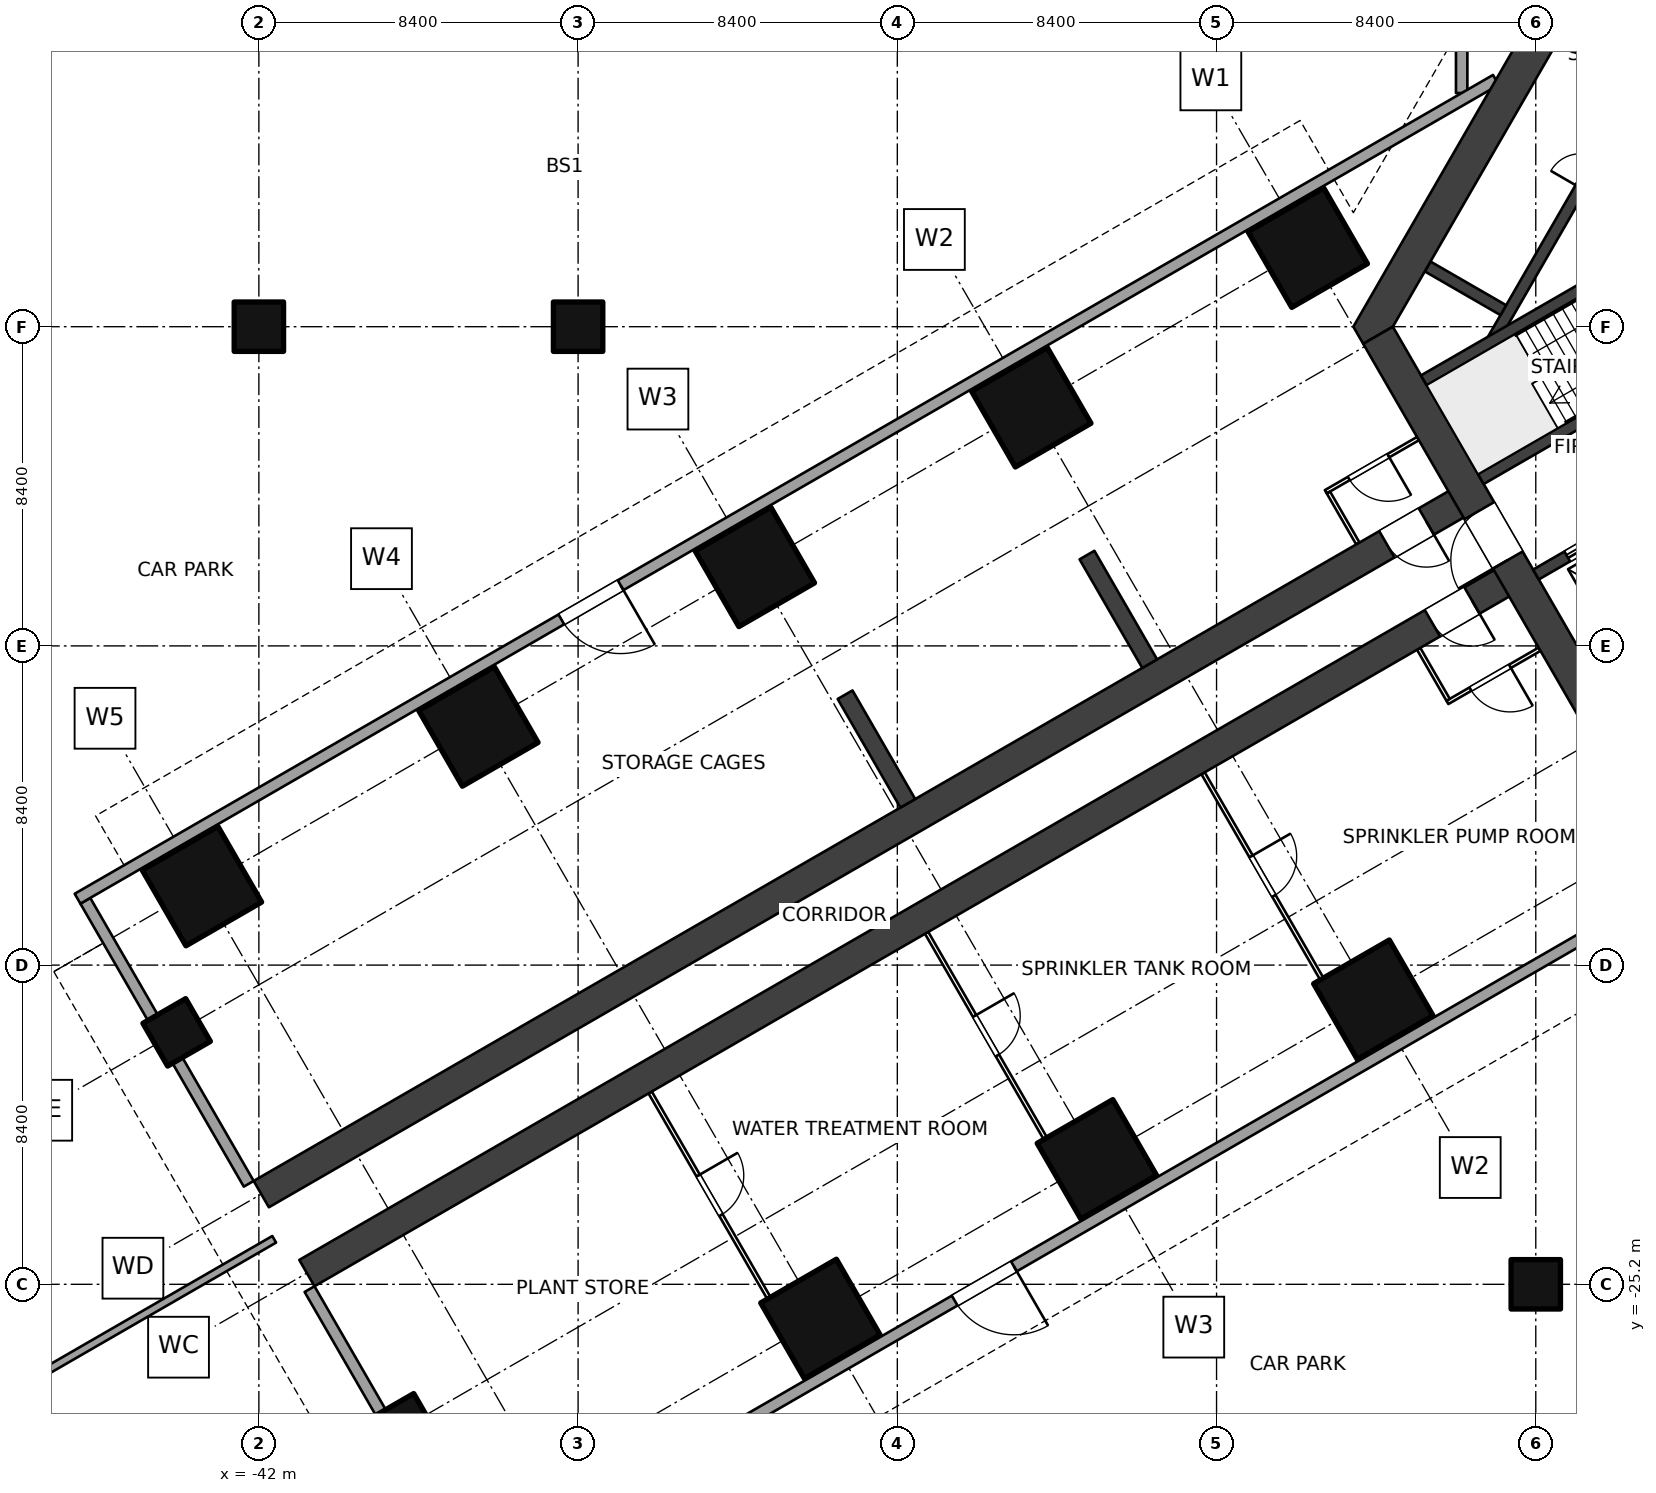
"""IFC4 building model, lengths in metres.
Left out: names, types, materials, properties, quantities, classifications, styles, units other than length and angle.
Written with IfcOpenShell. Run it as: python <this file> out.ifc"""

import sys

from ifc_helpers import new_model, si_unit, direction, frame, frame_2d, origin, origin_2d, place, context, subcontext, project, spatial, polyline, rectangle, outline, extrude, element, fill, save


model = new_model("IFC4")
c1 = context("Model", 3, precision=1e-05, world=origin(), true_north=direction((0.0, 1.0)))
c2 = subcontext(c1, "Body", "Model", "MODEL_VIEW")
j1 = project(units=[si_unit("LENGTHUNIT", "METRE"), si_unit("PLANEANGLEUNIT", "RADIAN")], contexts=[c1])
p1 = place(None, origin())
s1 = spatial("IfcSite", under=j1, at=p1, CompositionType="ELEMENT")
p2 = place(p1, origin())
s2 = spatial("IfcBuilding", under=s1, at=p2, CompositionType="ELEMENT")
p3 = place(p2, frame((0.0, 0.0, -10.5)))
s3 = spatial("IfcBuildingStorey", under=s2, at=p3, CompositionType="ELEMENT", Elevation=-10.5)
for number, where, z_axis, x_axis in (
    (1, (-14.4, 2.078, 0.0), (0.0, 0.0, 1.0), (-0.5, 0.866, 0.0)),
    (2, (-12.675, -17.71, 0.0), (0.0, 0.0, 1.0), (-0.5, 0.866, 0.0)),
    (3, (-21.675, -2.122, 0.0), (0.0, 0.0, 1.0), (-0.5, 0.866, 0.0)),
    (4, (-19.949, -21.91, 0.0), (0.0, 0.0, 1.0), (-0.5, 0.866, 0.0)),
    (5, (-28.949, -6.322, 0.0), (0.0, 0.0, 1.0), (-0.5, 0.866, 0.0)),
    (6, (-27.224, -26.11, 0.0), (0.0, 0.0, 1.0), (-0.5, 0.866, 0.0)),
    (7, (-36.224, -10.521, 0.0), (0.0, 0.0, 1.0), (-0.5, 0.866, 0.0)),
    (8, (-43.499, -14.721, 0.0), (0.0, 0.0, 1.0), (-0.5, 0.866, 0.0)),
):
    element("IfcColumn", number, at=place(p3, frame(where, z_axis=z_axis, x_axis=x_axis)), inside=s3, PredefinedType="COLUMN", context=c2, shape_type="SweptSolid", body=[
        extrude(rectangle(XDim=2.3, YDim=2.3, at=origin_2d()), origin(), (0.0, 0.0, 1.0), 3.5),
    ])
for number, where, z_axis, x_axis in (
    (9, (-38.164, -28.962, 0.0), (0.0, 0.0, 1.0), (-0.5, 0.866, 0.0)),
    (10, (-44.164, -18.57, 0.0), (0.0, 0.0, 1.0), (-0.5, 0.866, 0.0)),
    (11, (-42.0, 0.0, 0.0), (0.0, 0.0, 1.0), (1.0, 0.0, 0.0)),
    (12, (-33.6, 0.0, 0.0), (0.0, 0.0, 1.0), (1.0, 0.0, 0.0)),
    (13, (-8.4, -25.2, 0.0), (0.0, 0.0, 1.0), (1.0, 0.0, 0.0)),
):
    element("IfcColumn", number, at=place(p3, frame(where, z_axis=z_axis, x_axis=x_axis)), inside=s3, PredefinedType="COLUMN", context=c2, shape_type="SweptSolid", body=[
        extrude(rectangle(XDim=1.3, YDim=1.3, at=origin_2d()), origin(), (0.0, 0.0, 1.0), 3.5),
    ])
p4 = place(p3, frame((-6.47, -10.757, 0.0), z_axis=(0.0, 0.0, 1.0), x_axis=(-0.499997612506, 0.8660267822, 0.0)))
e14 = element("IfcWall", 14, at=p4, inside=s3, PredefinedType="SHEAR", context=c2, shape_type="SweptSolid", body=[
    extrude(rectangle(XDim=12.161, YDim=0.9, at=frame_2d((6.08, 0.0))), origin(), (0.0, 0.0, 1.0), 3.5),
])
p5 = place(p4, frame((5.33, 0.0, 0.0)))
e15 = element("IfcOpeningElement", 15, at=p5, cuts=e14, PredefinedType="OPENING", context=c2, shape_type="SweptSolid", body=[
    extrude(rectangle(XDim=1.5, YDim=2.1, at=frame_2d((0.75, 1.05))), frame((0.0, 0.46, 0.0), z_axis=(0.0, -1.0, 0.0), x_axis=(1.0, 0.0, 0.0)), (0.0, 0.0, 1.0), 0.92),
])
p6 = place(p3, origin())
e16 = element("IfcWall", 16, at=p6, inside=s3, PredefinedType="SHEAR", context=c2, shape_type="SweptSolid", body=[
    extrude(outline(polyline([(-6.6, 11.432), (-13.2, 0.0), (-12.94, -0.45), (-12.161, 0.0), (-6.08, 10.531), (-6.08, 11.432), (-6.6, 11.432)])), origin(), (0.0, 0.0, 1.0), 3.5),
])
p7 = place(p3, frame((-3.869, -0.559, 0.0), z_axis=(0.0, 0.0, 1.0), x_axis=(-0.86602711848, -0.499997030048, 0.0)))
e17 = element("IfcWall", 17, at=p7, inside=s3, PredefinedType="SHEAR", context=c2, shape_type="SweptSolid", body=[
    extrude(rectangle(XDim=6.901, YDim=0.3, at=frame_2d((3.451, 0.0))), origin(), (0.0, 0.0, 1.0), 3.5),
])
p8 = place(p7, frame((0.25, 0.0, 0.0)))
e18 = element("IfcOpeningElement", 18, at=p8, cuts=e17, PredefinedType="OPENING", context=c2, shape_type="SweptSolid", body=[
    extrude(rectangle(XDim=1.0, YDim=2.1, at=frame_2d((0.5, 1.05))), frame((0.0, 0.16, 0.0), z_axis=(0.0, -1.0, 0.0), x_axis=(1.0, 0.0, 0.0)), (0.0, 0.0, 1.0), 0.32),
])
p9 = place(p3, frame((-5.369, 2.039, 0.0), z_axis=(0.0, 0.0, 1.0), x_axis=(-0.86602711848, -0.499997030048, 0.0)))
e19 = element("IfcWall", 19, at=p9, inside=s3, PredefinedType="SHEAR", context=c2, shape_type="SweptSolid", body=[
    extrude(rectangle(XDim=6.901, YDim=0.3, at=frame_2d((3.451, 0.0))), origin(), (0.0, 0.0, 1.0), 3.5),
])
p10 = place(p3, frame((-2.419, -3.071, 0.0), z_axis=(0.0, 0.0, 1.0), x_axis=(-0.86602711848, -0.499997030048, 0.0)))
e20 = element("IfcWall", 20, at=p10, inside=s3, PredefinedType="SHEAR", context=c2, shape_type="SweptSolid", body=[
    extrude(rectangle(XDim=6.901, YDim=0.3, at=frame_2d((3.451, 0.0))), origin(), (0.0, 0.0, 1.0), 3.5),
])
p11 = place(p10, frame((4.85, 0.0, 0.0)))
e21 = element("IfcOpeningElement", 21, at=p11, cuts=e20, PredefinedType="OPENING", context=c2, shape_type="SweptSolid", body=[
    extrude(rectangle(XDim=1.1, YDim=2.1, at=frame_2d((0.55, 1.05))), frame((0.0, 0.16, 0.0), z_axis=(0.0, -1.0, 0.0), x_axis=(1.0, 0.0, 0.0)), (0.0, 0.0, 1.0), 0.32),
])
p12 = place(p3, frame((-9.548, -0.374, 0.0), z_axis=(0.0, 0.0, 1.0), x_axis=(0.500002290144, 0.866024081565, 0.0)))
e22 = element("IfcWall", 22, at=p12, inside=s3, PredefinedType="SHEAR", context=c2, shape_type="SweptSolid", body=[
    extrude(rectangle(XDim=10.195, YDim=0.3, at=frame_2d((5.098, 0.0))), origin(), (0.0, 0.0, 1.0), 3.5),
])
p13 = place(p12, frame((4.648, 0.0, 0.0)))
e23 = element("IfcOpeningElement", 23, at=p13, cuts=e22, PredefinedType="OPENING", context=c2, shape_type="SweptSolid", body=[
    extrude(rectangle(XDim=0.9, YDim=2.1, at=frame_2d((0.45, 1.05))), frame((0.0, 0.16, 0.0), z_axis=(0.0, -1.0, 0.0), x_axis=(1.0, 0.0, 0.0)), (0.0, 0.0, 1.0), 0.32),
])
p14 = place(p3, frame((-9.254, 0.435, 0.0), z_axis=(0.0, 0.0, 1.0), x_axis=(-0.866007057882, 0.500031774688, 0.0)))
e24 = element("IfcWall", 24, at=p14, inside=s3, PredefinedType="SHEAR", context=c2, shape_type="SweptSolid", body=[
    extrude(rectangle(XDim=2.3, YDim=0.3, at=frame_2d((1.15, 0.0))), origin(), (0.0, 0.0, 1.0), 3.5),
])
p15 = place(p3, frame((-8.91, -6.53, 0.0), z_axis=(0.0, 0.0, 1.0), x_axis=(-0.866025284237, -0.500000207062, 0.0)))
e25 = element("IfcWall", 25, at=p15, inside=s3, PredefinedType="SHEAR", context=c2, shape_type="SweptSolid", body=[
    extrude(rectangle(XDim=36.75, YDim=0.8, at=frame_2d((18.375, 0.0))), origin(), (0.0, 0.0, 1.0), 3.5),
])
p16 = place(p15, frame((1.35, 0.0, 0.0)))
e26 = element("IfcOpeningElement", 26, at=p16, cuts=e25, PredefinedType="OPENING", context=c2, shape_type="SweptSolid", body=[
    extrude(rectangle(XDim=1.2, YDim=2.1, at=frame_2d((0.6, 1.05))), frame((0.0, 0.41, 0.0), z_axis=(0.0, -1.0, 0.0), x_axis=(1.0, 0.0, 0.0)), (0.0, 0.0, 1.0), 0.82),
])
p17 = place(p3, frame((-10.11, -4.451, 0.0), z_axis=(0.0, 0.0, 1.0), x_axis=(-0.866025284237, -0.500000207062, 0.0)))
e27 = element("IfcWall", 27, at=p17, inside=s3, PredefinedType="SHEAR", context=c2, shape_type="SweptSolid", body=[
    extrude(rectangle(XDim=36.75, YDim=0.8, at=frame_2d((18.375, 0.0))), origin(), (0.0, 0.0, 1.0), 3.5),
])
p18 = place(p17, frame((1.35, 0.0, 0.0)))
e28 = element("IfcOpeningElement", 28, at=p18, cuts=e27, PredefinedType="OPENING", context=c2, shape_type="SweptSolid", body=[
    extrude(rectangle(XDim=1.2, YDim=2.1, at=frame_2d((0.6, 1.05))), frame((0.0, 0.41, 0.0), z_axis=(0.0, -1.0, 0.0), x_axis=(1.0, 0.0, 0.0)), (0.0, 0.0, 1.0), 0.82),
])
p19 = place(p3, frame((-8.3, -8.487, 0.0), z_axis=(0.0, 0.0, 1.0), x_axis=(-0.866034573852, -0.49998411664, 0.0)))
e29 = element("IfcWall", 29, at=p19, inside=s3, PredefinedType="PARTITIONING", context=c2, shape_type="SweptSolid", body=[
    extrude(rectangle(XDim=2.8, YDim=0.1, at=frame_2d((1.4, 0.0))), origin(), (0.0, 0.0, 1.0), 3.2),
])
p20 = place(p19, frame((0.9, 0.0, 0.0)))
e30 = element("IfcOpeningElement", 30, at=p20, cuts=e29, PredefinedType="OPENING", context=c2, shape_type="SweptSolid", body=[
    extrude(rectangle(XDim=1.2, YDim=2.1, at=frame_2d((0.6, 1.05))), frame((0.0, 0.06, 0.0), z_axis=(0.0, -1.0, 0.0), x_axis=(1.0, 0.0, 0.0)), (0.0, 0.0, 1.0), 0.12),
])
p21 = place(p3, frame((-11.482, -8.476, 0.0), z_axis=(0.0, 0.0, 1.0), x_axis=(0.500017819788, -0.86601511528, 0.0)))
e31 = element("IfcWall", 31, at=p21, inside=s3, PredefinedType="PARTITIONING", context=c2, shape_type="SweptSolid", body=[
    extrude(rectangle(XDim=1.55, YDim=0.1, at=frame_2d((0.775, 0.0))), origin(), (0.0, 0.0, 1.0), 3.2),
])
p22 = place(p3, frame((-17.154, -11.751, 0.0), z_axis=(0.0, 0.0, 1.0), x_axis=(0.500007509209, -0.866021068297, 0.0)))
e32 = element("IfcWall", 32, at=p22, inside=s3, PredefinedType="PARTITIONING", context=c2, shape_type="SweptSolid", body=[
    extrude(rectangle(XDim=8.6, YDim=0.1, at=frame_2d((4.3, 0.0))), origin(), (0.0, 0.0, 1.0), 3.2),
])
p23 = place(p22, frame((2.525, 0.0, 0.0)))
e33 = element("IfcOpeningElement", 33, at=p23, cuts=e32, PredefinedType="OPENING", context=c2, shape_type="SweptSolid", body=[
    extrude(rectangle(XDim=1.2, YDim=2.1, at=frame_2d((0.6, 1.05))), frame((0.0, 0.06, 0.0), z_axis=(0.0, -1.0, 0.0), x_axis=(1.0, 0.0, 0.0)), (0.0, 0.0, 1.0), 0.12),
])
p24 = place(p3, frame((-24.429, -15.951, 0.0), z_axis=(0.0, 0.0, 1.0), x_axis=(0.500007509209, -0.866021068297, 0.0)))
e34 = element("IfcWall", 34, at=p24, inside=s3, PredefinedType="PARTITIONING", context=c2, shape_type="SweptSolid", body=[
    extrude(rectangle(XDim=8.6, YDim=0.1, at=frame_2d((4.3, 0.0))), origin(), (0.0, 0.0, 1.0), 3.2),
])
p25 = place(p24, frame((2.525, 0.0, 0.0)))
e35 = element("IfcOpeningElement", 35, at=p25, cuts=e34, PredefinedType="OPENING", context=c2, shape_type="SweptSolid", body=[
    extrude(rectangle(XDim=1.2, YDim=2.1, at=frame_2d((0.6, 1.05))), frame((0.0, 0.06, 0.0), z_axis=(0.0, -1.0, 0.0), x_axis=(1.0, 0.0, 0.0)), (0.0, 0.0, 1.0), 0.12),
])
p26 = place(p3, frame((-31.703, -20.151, 0.0), z_axis=(0.0, 0.0, 1.0), x_axis=(0.500007509209, -0.866021068297, 0.0)))
e36 = element("IfcWall", 36, at=p26, inside=s3, PredefinedType="PARTITIONING", context=c2, shape_type="SweptSolid", body=[
    extrude(rectangle(XDim=8.6, YDim=0.1, at=frame_2d((4.3, 0.0))), origin(), (0.0, 0.0, 1.0), 3.2),
])
p27 = place(p26, frame((2.525, 0.0, 0.0)))
e37 = element("IfcOpeningElement", 37, at=p27, cuts=e36, PredefinedType="OPENING", context=c2, shape_type="SweptSolid", body=[
    extrude(rectangle(XDim=1.2, YDim=2.1, at=frame_2d((0.6, 1.05))), frame((0.0, 0.06, 0.0), z_axis=(0.0, -1.0, 0.0), x_axis=(1.0, 0.0, 0.0)), (0.0, 0.0, 1.0), 0.12),
])
p28 = place(p3, frame((-11.5, -2.945, 0.0), z_axis=(0.0, 0.0, 1.0), x_axis=(-0.866034573852, -0.49998411664, 0.0)))
e38 = element("IfcWall", 38, at=p28, inside=s3, PredefinedType="PARTITIONING", context=c2, shape_type="SweptSolid", body=[
    extrude(rectangle(XDim=2.8, YDim=0.1, at=frame_2d((1.4, 0.0))), origin(), (0.0, 0.0, 1.0), 3.2),
])
p29 = place(p28, frame((0.9, 0.0, 0.0)))
e39 = element("IfcOpeningElement", 39, at=p29, cuts=e38, PredefinedType="OPENING", context=c2, shape_type="SweptSolid", body=[
    extrude(rectangle(XDim=1.2, YDim=2.1, at=frame_2d((0.6, 1.05))), frame((0.0, 0.06, 0.0), z_axis=(0.0, -1.0, 0.0), x_axis=(1.0, 0.0, 0.0)), (0.0, 0.0, 1.0), 0.12),
])
p30 = place(p3, frame((-13.082, -5.705, 0.0), z_axis=(0.0, 0.0, 1.0), x_axis=(-0.500086022567, 0.865975732936, 0.0)))
e40 = element("IfcWall", 40, at=p30, inside=s3, PredefinedType="PARTITIONING", context=c2, shape_type="SweptSolid", body=[
    extrude(rectangle(XDim=1.55, YDim=0.1, at=frame_2d((0.775, 0.0))), origin(), (0.0, 0.0, 1.0), 3.2),
])
p31 = place(p3, frame((-41.596, -24.016, 0.0), z_axis=(0.0, 0.0, 1.0), x_axis=(-0.866034858292, -0.499983623955, 0.0)))
e41 = element("IfcWall", 41, at=p31, inside=s3, PredefinedType="SOLIDWALL", context=c2, shape_type="SweptSolid", body=[
    extrude(rectangle(XDim=10.627, YDim=0.2, at=frame_2d((5.313, 0.0))), origin(), (0.0, 0.0, 1.0), 3.2),
])
for number, where, z_axis, x_axis in (
    (42, (-40.667, -25.326, 0.0), (0.0, 0.0, 1.0), (0.5, -0.866, 0.0)),
    (43, (-42.267, -22.555, 0.0), (0.0, 0.0, 1.0), (-0.5, 0.866, 0.0)),
):
    element("IfcWall", number, at=place(p3, frame(where, z_axis=z_axis, x_axis=x_axis)), inside=s3, PredefinedType="SOLIDWALL", context=c2, shape_type="SweptSolid", body=[
        extrude(rectangle(XDim=8.6, YDim=0.3, at=frame_2d((4.3, 0.0))), origin(), (0.0, 0.0, 1.0), 1.9),
    ])
p32 = place(p3, frame((-10.35, 6.149, 0.0), z_axis=(0.0, 0.0, 1.0), x_axis=(0.0, 1.0, 0.0)))
e44 = element("IfcWall", 44, at=p32, inside=s3, PredefinedType="SOLIDWALL", context=c2, shape_type="SweptSolid", body=[
    extrude(rectangle(XDim=41.883, YDim=0.3, at=frame_2d((20.941, 0.0))), origin(), (0.0, 0.0, 1.0), 3.2),
])
p33 = place(p32, frame((25.383, 0.0, 0.0)))
e45 = element("IfcOpeningElement", 45, at=p33, cuts=e44, PredefinedType="OPENING", context=c2, shape_type="SweptSolid", body=[
    extrude(rectangle(XDim=1.8, YDim=2.4, at=frame_2d((0.9, 1.2))), frame((0.0, 0.16, 0.0), z_axis=(0.0, -1.0, 0.0), x_axis=(1.0, 0.0, 0.0)), (0.0, 0.0, 1.0), 0.32),
])
p34 = place(p3, frame((-0.15, -12.038, 0.0), z_axis=(0.0, 0.0, 1.0), x_axis=(-0.866026292622, -0.499998460486, 0.0)))
e46 = element("IfcWall", 46, at=p34, inside=s3, PredefinedType="SOLIDWALL", context=c2, shape_type="SweptSolid", body=[
    extrude(rectangle(XDim=41.883, YDim=0.3, at=frame_2d((20.941, 0.0))), origin(), (0.0, 0.0, 1.0), 3.2),
])
p35 = place(p34, frame((25.383, 0.0, 0.0)))
e47 = element("IfcOpeningElement", 47, at=p35, cuts=e46, PredefinedType="OPENING", context=c2, shape_type="SweptSolid", body=[
    extrude(rectangle(XDim=1.8, YDim=2.4, at=frame_2d((0.9, 1.2))), frame((0.0, 0.16, 0.0), z_axis=(0.0, -1.0, 0.0), x_axis=(1.0, 0.0, 0.0)), (0.0, 0.0, 1.0), 0.32),
])
p36 = place(p3, frame((-9.45, 6.495, 0.0), z_axis=(0.0, 0.0, 1.0), x_axis=(-0.866025301493, -0.500000177174, 0.0)))
e48 = element("IfcWall", 48, at=p36, inside=s3, PredefinedType="SOLIDWALL", context=c2, shape_type="SweptSolid", body=[
    extrude(rectangle(XDim=43.095, YDim=0.3, at=frame_2d((21.548, 0.0))), origin(), (0.0, 0.0, 1.0), 3.2),
])
p37 = place(p36, frame((26.595, 0.0, 0.0)))
e49 = element("IfcOpeningElement", 49, at=p37, cuts=e48, PredefinedType="OPENING", context=c2, shape_type="SweptSolid", body=[
    extrude(rectangle(XDim=1.8, YDim=2.4, at=frame_2d((0.9, 1.2))), frame((0.0, 0.16, 0.0), z_axis=(0.0, -1.0, 0.0), x_axis=(1.0, 0.0, 0.0)), (0.0, 0.0, 1.0), 0.32),
])
for number, where, z_axis, x_axis in (
    (50, (-18.559, -8.868, 0.0), (0.0, 0.0, 1.0), (-0.5, 0.866, 0.0)),
    (51, (-24.925, -12.543, 0.0), (0.0, 0.0, 1.0), (-0.5, 0.866, 0.0)),
):
    element("IfcWall", number, at=place(p3, frame(where, z_axis=z_axis, x_axis=x_axis)), inside=s3, PredefinedType="SOLIDWALL", context=c2, shape_type="SweptSolid", body=[
        extrude(rectangle(XDim=3.3, YDim=0.45, at=frame_2d((1.65, 0.0))), origin(), (0.0, 0.0, 1.0), 3.5),
    ])
p38 = place(p11, origin())
e52 = element("IfcDoor", 52, at=p38, inside=s3, OperationType="DOUBLE_DOOR_SLIDING", PredefinedType="DOOR", context=c2, shape_type="SweptSolid", body=[
    extrude(rectangle(XDim=1.1, YDim=2.1, at=frame_2d((0.55, 1.05))), frame((0.0, 0.025, 0.0), z_axis=(0.0, -1.0, 0.0), x_axis=(1.0, 0.0, 0.0)), (0.0, 0.0, 1.0), 0.05),
])
fill(e21, e52)
p39 = place(p5, origin())
e53 = element("IfcDoor", 53, at=p39, inside=s3, OperationType="DOUBLE_DOOR_DOUBLE_SWING", PredefinedType="DOOR", context=c2, shape_type="SweptSolid", body=[
    extrude(rectangle(XDim=1.5, YDim=2.1, at=frame_2d((0.75, 1.05))), frame((0.0, 0.025, 0.0), z_axis=(0.0, -1.0, 0.0), x_axis=(1.0, 0.0, 0.0)), (0.0, 0.0, 1.0), 0.05),
])
fill(e15, e53)
p40 = place(p16, origin())
e54 = element("IfcDoor", 54, at=p40, inside=s3, OperationType="DOUBLE_SWING_LEFT", PredefinedType="DOOR", context=c2, shape_type="SweptSolid", body=[
    extrude(rectangle(XDim=1.2, YDim=2.1, at=frame_2d((0.6, 1.05))), frame((0.0, 0.025, 0.0), z_axis=(0.0, -1.0, 0.0), x_axis=(1.0, 0.0, 0.0)), (0.0, 0.0, 1.0), 0.05),
])
fill(e26, e54)
p41 = place(p23, origin())
e55 = element("IfcDoor", 55, at=p41, inside=s3, OperationType="DOUBLE_SWING_LEFT", PredefinedType="DOOR", context=c2, shape_type="SweptSolid", body=[
    extrude(rectangle(XDim=1.2, YDim=2.1, at=frame_2d((0.6, 1.05))), frame((0.0, 0.025, 0.0), z_axis=(0.0, -1.0, 0.0), x_axis=(1.0, 0.0, 0.0)), (0.0, 0.0, 1.0), 0.05),
])
fill(e33, e55)
p42 = place(p25, origin())
e56 = element("IfcDoor", 56, at=p42, inside=s3, OperationType="DOUBLE_SWING_LEFT", PredefinedType="DOOR", context=c2, shape_type="SweptSolid", body=[
    extrude(rectangle(XDim=1.2, YDim=2.1, at=frame_2d((0.6, 1.05))), frame((0.0, 0.025, 0.0), z_axis=(0.0, -1.0, 0.0), x_axis=(1.0, 0.0, 0.0)), (0.0, 0.0, 1.0), 0.05),
])
fill(e35, e56)
p43 = place(p27, origin())
e57 = element("IfcDoor", 57, at=p43, inside=s3, OperationType="DOUBLE_SWING_LEFT", PredefinedType="DOOR", context=c2, shape_type="SweptSolid", body=[
    extrude(rectangle(XDim=1.2, YDim=2.1, at=frame_2d((0.6, 1.05))), frame((0.0, 0.025, 0.0), z_axis=(0.0, -1.0, 0.0), x_axis=(1.0, 0.0, 0.0)), (0.0, 0.0, 1.0), 0.05),
])
fill(e37, e57)
p44 = place(p20, origin())
e58 = element("IfcDoor", 58, at=p44, inside=s3, OperationType="DOUBLE_SWING_LEFT", PredefinedType="DOOR", context=c2, shape_type="SweptSolid", body=[
    extrude(rectangle(XDim=1.2, YDim=2.1, at=frame_2d((0.6, 1.05))), frame((0.0, 0.025, 0.0), z_axis=(0.0, -1.0, 0.0), x_axis=(1.0, 0.0, 0.0)), (0.0, 0.0, 1.0), 0.05),
])
fill(e30, e58)
p45 = place(p18, origin())
e59 = element("IfcDoor", 59, at=p45, inside=s3, OperationType="DOUBLE_SWING_LEFT", PredefinedType="DOOR", context=c2, shape_type="SweptSolid", body=[
    extrude(rectangle(XDim=1.2, YDim=2.1, at=frame_2d((0.6, 1.05))), frame((0.0, 0.025, 0.0), z_axis=(0.0, -1.0, 0.0), x_axis=(1.0, 0.0, 0.0)), (0.0, 0.0, 1.0), 0.05),
])
fill(e28, e59)
p46 = place(p29, origin())
e60 = element("IfcDoor", 60, at=p46, inside=s3, OperationType="DOUBLE_SWING_LEFT", PredefinedType="DOOR", context=c2, shape_type="SweptSolid", body=[
    extrude(rectangle(XDim=1.2, YDim=2.1, at=frame_2d((0.6, 1.05))), frame((0.0, 0.025, 0.0), z_axis=(0.0, -1.0, 0.0), x_axis=(1.0, 0.0, 0.0)), (0.0, 0.0, 1.0), 0.05),
])
fill(e39, e60)
p47 = place(p35, origin())
e61 = element("IfcDoor", 61, at=p47, inside=s3, OperationType="DOUBLE_DOOR_DOUBLE_SWING", PredefinedType="DOOR", context=c2, shape_type="SweptSolid", body=[
    extrude(rectangle(XDim=1.8, YDim=2.4, at=frame_2d((0.9, 1.2))), frame((0.0, 0.025, 0.0), z_axis=(0.0, -1.0, 0.0), x_axis=(1.0, 0.0, 0.0)), (0.0, 0.0, 1.0), 0.05),
])
fill(e47, e61)
p48 = place(p37, origin())
e62 = element("IfcDoor", 62, at=p48, inside=s3, OperationType="DOUBLE_DOOR_DOUBLE_SWING", PredefinedType="DOOR", context=c2, shape_type="SweptSolid", body=[
    extrude(rectangle(XDim=1.8, YDim=2.4, at=frame_2d((0.9, 1.2))), frame((0.0, 0.025, 0.0), z_axis=(0.0, -1.0, 0.0), x_axis=(1.0, 0.0, 0.0)), (0.0, 0.0, 1.0), 0.05),
])
fill(e49, e62)
save(model, sys.argv[1])
